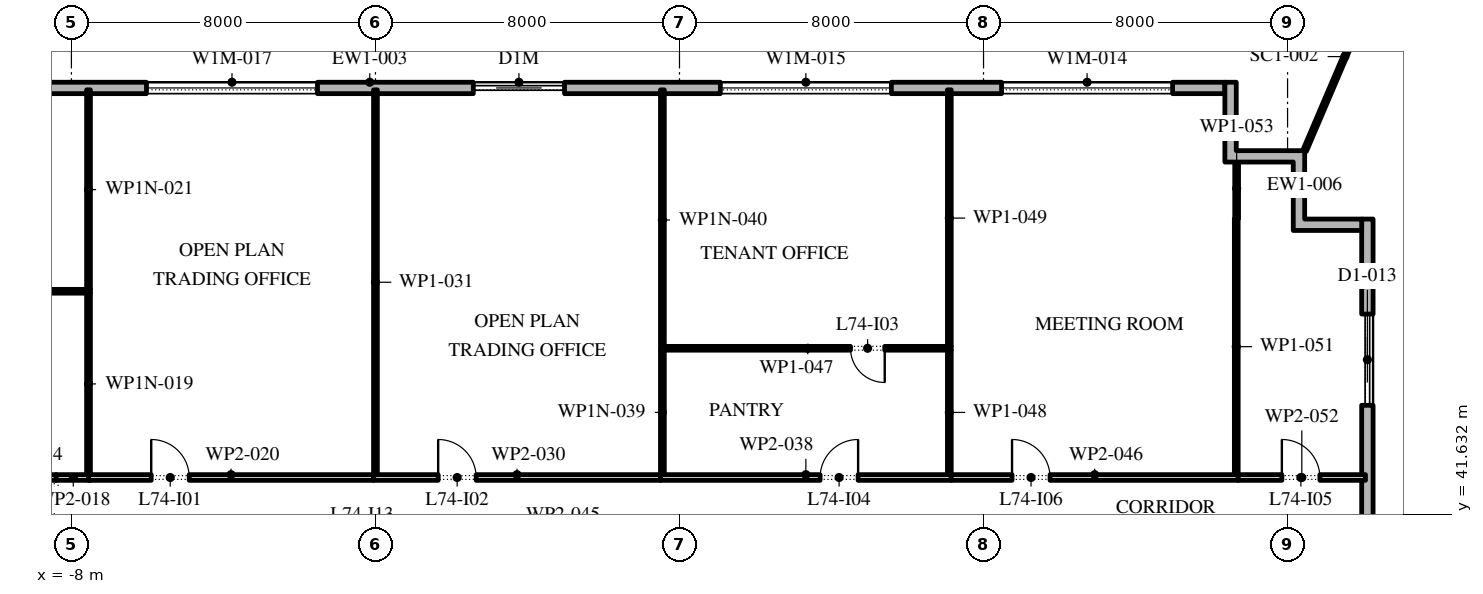
"""IFC4 building model, lengths in metres.
Left out: names, types, materials, properties, quantities, classifications, styles, units other than length and angle.
Written with IfcOpenShell. Run it as: python <this file> out.ifc"""

import sys

from ifc_helpers import new_model, si_unit, direction, frame, frame_2d, origin, place, context, subcontext, project, spatial, polyline, rectangle, outline, extrude, element, fill, save


model = new_model("IFC4")
c1 = context("Model", 3, precision=1e-05, world=origin(), true_north=direction((0.0, 1.0)))
c2 = subcontext(c1, "Body", "Model", "MODEL_VIEW")
j1 = project(units=[si_unit("LENGTHUNIT", "METRE"), si_unit("PLANEANGLEUNIT", "RADIAN")], contexts=[c1])
p1 = place(None, origin())
s1 = spatial("IfcSite", under=j1, at=p1, CompositionType="ELEMENT")
p2 = place(p1, origin())
s2 = spatial("IfcBuilding", under=s1, at=p2, CompositionType="ELEMENT")
p3 = place(p2, frame((0.0, 0.0, 338.4)))
s3 = spatial("IfcBuildingStorey", under=s2, at=p3, CompositionType="ELEMENT", Elevation=338.4)
p4 = place(p3, frame((26.1, -2.1, 0.0), z_axis=(0.0, 0.0, 1.0), x_axis=(0.0, 1.0, 0.0)))
e1 = element("IfcWall", 1, at=p4, inside=s3, PredefinedType="STANDARD", context=c2, shape_type="SweptSolid", body=[
    extrude(rectangle(XDim=51.5, YDim=0.3, at=frame_2d((25.75, 0.0))), origin(), (0.0, 0.0, 1.0), 4.0),
])
p5 = place(p4, frame((1.3, 0.0, 0.45)))
e2 = element("IfcOpeningElement", 2, at=p5, cuts=e1, PredefinedType="OPENING", context=c2, shape_type="SweptSolid", body=[
    extrude(rectangle(XDim=4.5, YDim=3.05, at=frame_2d((2.25, 1.525))), frame((0.0, 0.16, 0.0), z_axis=(0.0, -1.0, 0.0), x_axis=(1.0, 0.0, 0.0)), (0.0, 0.0, 1.0), 0.32),
])
p6 = place(p4, frame((8.55, 0.0, 0.45)))
e3 = element("IfcOpeningElement", 3, at=p6, cuts=e1, PredefinedType="OPENING", context=c2, shape_type="SweptSolid", body=[
    extrude(rectangle(XDim=4.5, YDim=3.05, at=frame_2d((2.25, 1.525))), frame((0.0, 0.16, 0.0), z_axis=(0.0, -1.0, 0.0), x_axis=(1.0, 0.0, 0.0)), (0.0, 0.0, 1.0), 0.32),
])
p7 = place(p4, frame((17.0, 0.0, 0.0)))
e4 = element("IfcOpeningElement", 4, at=p7, cuts=e1, PredefinedType="OPENING", context=c2, shape_type="SweptSolid", body=[
    extrude(rectangle(XDim=2.4, YDim=3.5, at=frame_2d((1.2, 1.75))), frame((0.0, 0.16, 0.0), z_axis=(0.0, -1.0, 0.0), x_axis=(1.0, 0.0, 0.0)), (0.0, 0.0, 1.0), 0.32),
])
p8 = place(p4, frame((23.35, 0.0, 0.45)))
e5 = element("IfcOpeningElement", 5, at=p8, cuts=e1, PredefinedType="OPENING", context=c2, shape_type="SweptSolid", body=[
    extrude(rectangle(XDim=4.5, YDim=3.05, at=frame_2d((2.25, 1.525))), frame((0.0, 0.16, 0.0), z_axis=(0.0, -1.0, 0.0), x_axis=(1.0, 0.0, 0.0)), (0.0, 0.0, 1.0), 0.32),
])
p9 = place(p4, frame((30.75, 0.0, 0.45)))
e6 = element("IfcOpeningElement", 6, at=p9, cuts=e1, PredefinedType="OPENING", context=c2, shape_type="SweptSolid", body=[
    extrude(rectangle(XDim=4.5, YDim=3.05, at=frame_2d((2.25, 1.525))), frame((0.0, 0.16, 0.0), z_axis=(0.0, -1.0, 0.0), x_axis=(1.0, 0.0, 0.0)), (0.0, 0.0, 1.0), 0.32),
])
p10 = place(p4, frame((38.15, 0.0, 0.45)))
e7 = element("IfcOpeningElement", 7, at=p10, cuts=e1, PredefinedType="OPENING", context=c2, shape_type="SweptSolid", body=[
    extrude(rectangle(XDim=4.5, YDim=3.05, at=frame_2d((2.25, 1.525))), frame((0.0, 0.16, 0.0), z_axis=(0.0, -1.0, 0.0), x_axis=(1.0, 0.0, 0.0)), (0.0, 0.0, 1.0), 0.32),
])
p11 = place(p4, frame((46.6, 0.0, 0.0)))
e8 = element("IfcOpeningElement", 8, at=p11, cuts=e1, PredefinedType="OPENING", context=c2, shape_type="SweptSolid", body=[
    extrude(rectangle(XDim=2.4, YDim=3.5, at=frame_2d((1.2, 1.75))), frame((0.0, 0.16, 0.0), z_axis=(0.0, -1.0, 0.0), x_axis=(1.0, 0.0, 0.0)), (0.0, 0.0, 1.0), 0.32),
])
p12 = place(p3, frame((22.35, 52.85, 0.0), z_axis=(0.0, 0.0, 1.0), x_axis=(-1.0, 0.0, 0.0)))
e9 = element("IfcWall", 9, at=p12, inside=s3, PredefinedType="STANDARD", context=c2, shape_type="SweptSolid", body=[
    extrude(rectangle(XDim=45.0, YDim=0.3, at=frame_2d((22.5, 0.0))), origin(), (0.0, 0.0, 1.0), 4.0),
])
p13 = place(p12, frame((1.375, 0.0, 0.45)))
e10 = element("IfcOpeningElement", 10, at=p13, cuts=e9, PredefinedType="OPENING", context=c2, shape_type="SweptSolid", body=[
    extrude(rectangle(XDim=4.5, YDim=2.575, at=frame_2d((2.25, 1.288))), frame((0.0, 0.16, 0.0), z_axis=(0.0, -1.0, 0.0), x_axis=(1.0, 0.0, 0.0)), (0.0, 0.0, 1.0), 0.32),
])
p14 = place(p12, frame((8.775, 0.0, 0.45)))
e11 = element("IfcOpeningElement", 11, at=p14, cuts=e9, PredefinedType="OPENING", context=c2, shape_type="SweptSolid", body=[
    extrude(rectangle(XDim=4.5, YDim=2.575, at=frame_2d((2.25, 1.288))), frame((0.0, 0.16, 0.0), z_axis=(0.0, -1.0, 0.0), x_axis=(1.0, 0.0, 0.0)), (0.0, 0.0, 1.0), 0.32),
])
p15 = place(p12, frame((17.375, 0.0, 0.0)))
e12 = element("IfcOpeningElement", 12, at=p15, cuts=e9, PredefinedType="OPENING", context=c2, shape_type="SweptSolid", body=[
    extrude(rectangle(XDim=2.4, YDim=3.025, at=frame_2d((1.2, 1.512))), frame((0.0, 0.16, 0.0), z_axis=(0.0, -1.0, 0.0), x_axis=(1.0, 0.0, 0.0)), (0.0, 0.0, 1.0), 0.32),
])
p16 = place(p12, frame((23.875, 0.0, 0.45)))
e13 = element("IfcOpeningElement", 13, at=p16, cuts=e9, PredefinedType="OPENING", context=c2, shape_type="SweptSolid", body=[
    extrude(rectangle(XDim=4.5, YDim=2.575, at=frame_2d((2.25, 1.288))), frame((0.0, 0.16, 0.0), z_axis=(0.0, -1.0, 0.0), x_axis=(1.0, 0.0, 0.0)), (0.0, 0.0, 1.0), 0.32),
])
p17 = place(p12, frame((31.425, 0.0, 0.45)))
e14 = element("IfcOpeningElement", 14, at=p17, cuts=e9, PredefinedType="OPENING", context=c2, shape_type="SweptSolid", body=[
    extrude(rectangle(XDim=4.5, YDim=2.575, at=frame_2d((2.25, 1.288))), frame((0.0, 0.16, 0.0), z_axis=(0.0, -1.0, 0.0), x_axis=(1.0, 0.0, 0.0)), (0.0, 0.0, 1.0), 0.32),
])
p18 = place(p12, frame((38.975, 0.0, 0.45)))
e15 = element("IfcOpeningElement", 15, at=p18, cuts=e9, PredefinedType="OPENING", context=c2, shape_type="SweptSolid", body=[
    extrude(rectangle(XDim=4.5, YDim=2.575, at=frame_2d((2.25, 1.288))), frame((0.0, 0.16, 0.0), z_axis=(0.0, -1.0, 0.0), x_axis=(1.0, 0.0, 0.0)), (0.0, 0.0, 1.0), 0.32),
])
p19 = place(p3, origin())
e16 = element("IfcWall", 16, at=p19, inside=s3, PredefinedType="STANDARD", context=c2, shape_type="SweptSolid", body=[
    extrude(outline(polyline([(24.15, 50.9), (22.35, 50.9), (22.35, 53.0), (22.65, 53.0), (22.65, 51.2), (24.45, 51.2), (24.45, 49.4), (25.95, 49.4), (25.95, 49.1), (24.15, 49.1), (24.15, 50.9)])), origin(), (0.0, 0.0, 1.0), 4.0),
])
p20 = place(p3, frame((24.45, 51.2, -0.05), z_axis=(0.0, 0.0, 1.0), x_axis=(0.392867927022, 0.919594906422, 0.0)))
e17 = element("IfcWall", 17, at=p20, inside=s3, PredefinedType="STANDARD", context=c2, shape_type="SweptSolid", body=[
    extrude(rectangle(XDim=5.382, YDim=0.1, at=frame_2d((2.691, 0.0))), origin(), (0.0, 0.0, 1.0), 4.05),
])
p21 = place(p3, frame((-15.05, 47.5, 0.0), z_axis=(0.0, 0.0, 1.0), x_axis=(1.0, 0.0, 0.0)))
e18 = element("IfcWall", 18, at=p21, inside=s3, PredefinedType="PARTITIONING", context=c2, shape_type="SweptSolid", body=[
    extrude(rectangle(XDim=7.55, YDim=0.1, at=frame_2d((3.775, 0.0))), origin(), (0.0, 0.0, 1.0), 4.0),
])
p22 = place(p21, frame((4.9, 0.0, 0.0)))
e19 = element("IfcOpeningElement", 19, at=p22, cuts=e18, PredefinedType="OPENING", context=c2, shape_type="SweptSolid", body=[
    extrude(rectangle(XDim=0.9, YDim=2.1, at=frame_2d((0.45, 1.05))), frame((0.0, 0.06, 0.0), z_axis=(0.0, -1.0, 0.0), x_axis=(1.0, 0.0, 0.0)), (0.0, 0.0, 1.0), 0.12),
])
p23 = place(p3, frame((-10.0, 42.6, 0.0), z_axis=(0.0, 0.0, 1.0), x_axis=(1.0, 0.0, 0.0)))
e20 = element("IfcWall", 20, at=p23, inside=s3, PredefinedType="PARTITIONING", context=c2, shape_type="SweptSolid", body=[
    extrude(rectangle(XDim=1.6, YDim=0.15, at=frame_2d((0.8, 0.0))), origin(), (0.0, 0.0, 1.0), 4.0),
])
p24 = place(p3, frame((-8.4, 42.6, 0.0), z_axis=(0.0, 0.0, 1.0), x_axis=(1.0, 0.0, 0.0)))
e21 = element("IfcWall", 21, at=p24, inside=s3, PredefinedType="PARTITIONING", context=c2, shape_type="SweptSolid", body=[
    extrude(rectangle(XDim=0.9, YDim=0.15, at=frame_2d((0.45, 0.0))), origin(), (0.0, 0.0, 1.0), 4.0),
])
p25 = place(p3, frame((-7.55, 42.675, 0.0), z_axis=(0.0, 0.0, 1.0), x_axis=(0.0, 1.0, 0.0)))
e22 = element("IfcWall", 22, at=p25, inside=s3, PredefinedType="PARTITIONING", context=c2, shape_type="SweptSolid", body=[
    extrude(rectangle(XDim=4.775, YDim=0.1, at=frame_2d((2.387, 0.0))), origin(), (0.0, 0.0, 1.0), 3.164),
])
p26 = place(p3, frame((-7.55, 42.6, 0.0), z_axis=(0.0, 0.0, 1.0), x_axis=(1.0, 0.0, 0.0)))
e23 = element("IfcWall", 23, at=p26, inside=s3, PredefinedType="PARTITIONING", context=c2, shape_type="SweptSolid", body=[
    extrude(rectangle(XDim=7.5, YDim=0.15, at=frame_2d((3.75, 0.0))), origin(), (0.0, 0.0, 1.0), 4.0),
])
p27 = place(p26, frame((1.65, 0.0, 0.0)))
e24 = element("IfcOpeningElement", 24, at=p27, cuts=e23, PredefinedType="OPENING", context=c2, shape_type="SweptSolid", body=[
    extrude(rectangle(XDim=1.0, YDim=2.1, at=frame_2d((0.5, 1.05))), frame((0.0, 0.085, 0.0), z_axis=(0.0, -1.0, 0.0), x_axis=(1.0, 0.0, 0.0)), (0.0, 0.0, 1.0), 0.17),
])
p28 = place(p3, frame((-7.55, 47.55, 0.0), z_axis=(0.0, 0.0, 1.0), x_axis=(0.0, 1.0, 0.0)))
e25 = element("IfcWall", 25, at=p28, inside=s3, PredefinedType="PARTITIONING", context=c2, shape_type="SweptSolid", body=[
    extrude(rectangle(XDim=5.25, YDim=0.1, at=frame_2d((2.625, 0.0))), origin(), (0.0, 0.0, 1.0), 3.164),
])
p29 = place(p3, frame((-0.05, 42.6, 0.0), z_axis=(0.0, 0.0, 1.0), x_axis=(1.0, 0.0, 0.0)))
e26 = element("IfcWall", 26, at=p29, inside=s3, PredefinedType="PARTITIONING", context=c2, shape_type="SweptSolid", body=[
    extrude(rectangle(XDim=7.55, YDim=0.15, at=frame_2d((3.775, 0.0))), origin(), (0.0, 0.0, 1.0), 4.0),
])
p30 = place(p29, frame((1.7, 0.0, 0.0)))
e27 = element("IfcOpeningElement", 27, at=p30, cuts=e26, PredefinedType="OPENING", context=c2, shape_type="SweptSolid", body=[
    extrude(rectangle(XDim=1.0, YDim=2.1, at=frame_2d((0.5, 1.05))), frame((0.0, 0.085, 0.0), z_axis=(0.0, -1.0, 0.0), x_axis=(1.0, 0.0, 0.0)), (0.0, 0.0, 1.0), 0.17),
])
p31 = place(p3, frame((0.0, 52.8, 0.0), z_axis=(0.0, 0.0, 1.0), x_axis=(0.0, -1.0, 0.0)))
e28 = element("IfcWall", 28, at=p31, inside=s3, PredefinedType="PARTITIONING", context=c2, shape_type="SweptSolid", body=[
    extrude(rectangle(XDim=10.125, YDim=0.1, at=frame_2d((5.062, 0.0))), origin(), (0.0, 0.0, 1.0), 4.0),
])
p32 = place(p3, frame((7.5, 42.6, 0.0), z_axis=(0.0, 0.0, 1.0), x_axis=(1.0, 0.0, 0.0)))
e29 = element("IfcWall", 29, at=p32, inside=s3, PredefinedType="PARTITIONING", context=c2, shape_type="SweptSolid", body=[
    extrude(rectangle(XDim=7.65, YDim=0.15, at=frame_2d((3.825, 0.0))), origin(), (0.0, 0.0, 1.0), 4.0),
])
p33 = place(p32, frame((4.2, 0.0, 0.0)))
e30 = element("IfcOpeningElement", 30, at=p33, cuts=e29, PredefinedType="OPENING", context=c2, shape_type="SweptSolid", body=[
    extrude(rectangle(XDim=1.0, YDim=2.1, at=frame_2d((0.5, 1.05))), frame((0.0, 0.085, 0.0), z_axis=(0.0, -1.0, 0.0), x_axis=(1.0, 0.0, 0.0)), (0.0, 0.0, 1.0), 0.17),
])
p34 = place(p3, frame((7.55, 45.95, 0.0), z_axis=(0.0, 0.0, 1.0), x_axis=(0.0, -1.0, 0.0)))
e31 = element("IfcWall", 31, at=p34, inside=s3, PredefinedType="PARTITIONING", context=c2, shape_type="SweptSolid", body=[
    extrude(rectangle(XDim=3.275, YDim=0.1, at=frame_2d((1.637, 0.0))), origin(), (0.0, 0.0, 1.0), 3.164),
])
p35 = place(p3, frame((7.55, 52.8, 0.0), z_axis=(0.0, 0.0, 1.0), x_axis=(0.0, -1.0, 0.0)))
e32 = element("IfcWall", 32, at=p35, inside=s3, PredefinedType="PARTITIONING", context=c2, shape_type="SweptSolid", body=[
    extrude(rectangle(XDim=6.85, YDim=0.1, at=frame_2d((3.425, 0.0))), origin(), (0.0, 0.0, 1.0), 3.164),
])
p36 = place(p3, frame((15.15, 42.6, 0.0), z_axis=(0.0, 0.0, 1.0), x_axis=(1.0, 0.0, 0.0)))
e33 = element("IfcWall", 33, at=p36, inside=s3, PredefinedType="PARTITIONING", context=c2, shape_type="SweptSolid", body=[
    extrude(rectangle(XDim=7.55, YDim=0.15, at=frame_2d((3.775, 0.0))), origin(), (0.0, 0.0, 1.0), 4.0),
])
p37 = place(p36, frame((1.6, 0.0, 0.0)))
e34 = element("IfcOpeningElement", 34, at=p37, cuts=e33, PredefinedType="OPENING", context=c2, shape_type="SweptSolid", body=[
    extrude(rectangle(XDim=1.0, YDim=2.1, at=frame_2d((0.5, 1.05))), frame((0.0, 0.085, 0.0), z_axis=(0.0, -1.0, 0.0), x_axis=(1.0, 0.0, 0.0)), (0.0, 0.0, 1.0), 0.17),
])
p38 = place(p3, frame((15.15, 46.0, 0.0), z_axis=(0.0, 0.0, 1.0), x_axis=(-1.0, 0.0, 0.0)))
e35 = element("IfcWall", 35, at=p38, inside=s3, PredefinedType="PARTITIONING", context=c2, shape_type="SweptSolid", body=[
    extrude(rectangle(XDim=7.55, YDim=0.1, at=frame_2d((3.775, 0.0))), origin(), (0.0, 0.0, 1.0), 4.0),
])
p39 = place(p38, frame((1.75, 0.0, 0.0)))
e36 = element("IfcOpeningElement", 36, at=p39, cuts=e35, PredefinedType="OPENING", context=c2, shape_type="SweptSolid", body=[
    extrude(rectangle(XDim=0.9, YDim=2.1, at=frame_2d((0.45, 1.05))), frame((0.0, 0.06, 0.0), z_axis=(0.0, -1.0, 0.0), x_axis=(1.0, 0.0, 0.0)), (0.0, 0.0, 1.0), 0.12),
])
p40 = place(p3, frame((15.1, 45.95, 0.0), z_axis=(0.0, 0.0, 1.0), x_axis=(0.0, -1.0, 0.0)))
e37 = element("IfcWall", 37, at=p40, inside=s3, PredefinedType="PARTITIONING", context=c2, shape_type="SweptSolid", body=[
    extrude(rectangle(XDim=3.275, YDim=0.1, at=frame_2d((1.637, 0.0))), origin(), (0.0, 0.0, 1.0), 4.0),
])
p41 = place(p3, frame((15.1, 52.8, 0.0), z_axis=(0.0, 0.0, 1.0), x_axis=(0.0, -1.0, 0.0)))
e38 = element("IfcWall", 38, at=p41, inside=s3, PredefinedType="PARTITIONING", context=c2, shape_type="SweptSolid", body=[
    extrude(rectangle(XDim=6.75, YDim=0.1, at=frame_2d((3.375, 0.0))), origin(), (0.0, 0.0, 1.0), 4.0),
])
p42 = place(p3, frame((22.65, 42.675, 0.0), z_axis=(0.0, 0.0, 1.0), x_axis=(0.0, 1.0, 0.0)))
e39 = element("IfcWall", 39, at=p42, inside=s3, PredefinedType="PARTITIONING", context=c2, shape_type="SweptSolid", body=[
    extrude(rectangle(XDim=6.735, YDim=0.1, at=frame_2d((3.367, 0.0))), origin(), (0.0, 0.0, 1.0), 4.0),
])
p43 = place(p3, frame((22.7, 42.6, 0.0), z_axis=(0.0, 0.0, 1.0), x_axis=(1.0, 0.0, 0.0)))
e40 = element("IfcWall", 40, at=p43, inside=s3, PredefinedType="PARTITIONING", context=c2, shape_type="SweptSolid", body=[
    extrude(rectangle(XDim=3.35, YDim=0.15, at=frame_2d((1.675, 0.0))), origin(), (0.0, 0.0, 1.0), 4.0),
])
p44 = place(p43, frame((1.15, 0.0, 0.0)))
e41 = element("IfcOpeningElement", 41, at=p44, cuts=e40, PredefinedType="OPENING", context=c2, shape_type="SweptSolid", body=[
    extrude(rectangle(XDim=1.0, YDim=2.1, at=frame_2d((0.5, 1.05))), frame((0.0, 0.085, 0.0), z_axis=(0.0, -1.0, 0.0), x_axis=(1.0, 0.0, 0.0)), (0.0, 0.0, 1.0), 0.17),
])
p45 = place(p3, frame((22.66, 49.41, 0.0), z_axis=(0.0, 0.0, 1.0), x_axis=(0.0, 1.0, 0.0)))
e42 = element("IfcWall", 42, at=p45, inside=s3, PredefinedType="PARTITIONING", context=c2, shape_type="SweptSolid", body=[
    extrude(rectangle(XDim=1.59, YDim=0.1, at=frame_2d((0.795, 0.0))), origin(), (0.0, 0.0, 1.0), 4.0),
])
p46 = place(p11, origin())
e43 = element("IfcDoor", 43, at=p46, inside=s3, OperationType="DOUBLE_DOOR_SLIDING", PredefinedType="DOOR", context=c2, shape_type="SweptSolid", body=[
    extrude(rectangle(XDim=2.4, YDim=3.5, at=frame_2d((1.2, 1.75))), frame((0.0, 0.025, 0.0), z_axis=(0.0, -1.0, 0.0), x_axis=(1.0, 0.0, 0.0)), (0.0, 0.0, 1.0), 0.05),
])
fill(e8, e43)
p47 = place(p13, origin())
e44 = element("IfcWindow", 44, at=p47, inside=s3, PartitioningType="DOUBLE_PANEL_VERTICAL", PredefinedType="WINDOW", context=c2, shape_type="SweptSolid", body=[
    extrude(rectangle(XDim=4.5, YDim=2.575, at=frame_2d((2.25, 1.288))), frame((0.0, 0.03, 0.0), z_axis=(0.0, -1.0, 0.0), x_axis=(1.0, 0.0, 0.0)), (0.0, 0.0, 1.0), 0.06),
])
fill(e10, e44)
p48 = place(p14, origin())
e45 = element("IfcWindow", 45, at=p48, inside=s3, PartitioningType="DOUBLE_PANEL_VERTICAL", PredefinedType="WINDOW", context=c2, shape_type="SweptSolid", body=[
    extrude(rectangle(XDim=4.5, YDim=2.575, at=frame_2d((2.25, 1.288))), frame((0.0, 0.03, 0.0), z_axis=(0.0, -1.0, 0.0), x_axis=(1.0, 0.0, 0.0)), (0.0, 0.0, 1.0), 0.06),
])
fill(e11, e45)
p49 = place(p15, origin())
e46 = element("IfcDoor", 46, at=p49, inside=s3, OperationType="DOUBLE_DOOR_SLIDING", PredefinedType="DOOR", context=c2, shape_type="SweptSolid", body=[
    extrude(rectangle(XDim=2.4, YDim=3.025, at=frame_2d((1.2, 1.512))), frame((0.0, 0.025, 0.0), z_axis=(0.0, -1.0, 0.0), x_axis=(1.0, 0.0, 0.0)), (0.0, 0.0, 1.0), 0.05),
])
fill(e12, e46)
p50 = place(p16, origin())
e47 = element("IfcWindow", 47, at=p50, inside=s3, PartitioningType="DOUBLE_PANEL_VERTICAL", PredefinedType="WINDOW", context=c2, shape_type="SweptSolid", body=[
    extrude(rectangle(XDim=4.5, YDim=2.575, at=frame_2d((2.25, 1.288))), frame((0.0, 0.03, 0.0), z_axis=(0.0, -1.0, 0.0), x_axis=(1.0, 0.0, 0.0)), (0.0, 0.0, 1.0), 0.06),
])
fill(e13, e47)
p51 = place(p27, origin())
e48 = element("IfcDoor", 48, at=p51, inside=s3, OperationType="SINGLE_SWING_RIGHT", PredefinedType="DOOR", context=c2, shape_type="SweptSolid", body=[
    extrude(rectangle(XDim=1.0, YDim=2.1, at=frame_2d((0.5, 1.05))), frame((0.0, 0.025, 0.0), z_axis=(0.0, -1.0, 0.0), x_axis=(1.0, 0.0, 0.0)), (0.0, 0.0, 1.0), 0.05),
])
fill(e24, e48)
p52 = place(p30, origin())
e49 = element("IfcDoor", 49, at=p52, inside=s3, OperationType="SINGLE_SWING_RIGHT", PredefinedType="DOOR", context=c2, shape_type="SweptSolid", body=[
    extrude(rectangle(XDim=1.0, YDim=2.1, at=frame_2d((0.5, 1.05))), frame((0.0, 0.025, 0.0), z_axis=(0.0, -1.0, 0.0), x_axis=(1.0, 0.0, 0.0)), (0.0, 0.0, 1.0), 0.05),
])
fill(e27, e49)
p53 = place(p39, origin())
e50 = element("IfcDoor", 50, at=p53, inside=s3, OperationType="SINGLE_SWING_RIGHT", PredefinedType="DOOR", context=c2, shape_type="SweptSolid", body=[
    extrude(rectangle(XDim=0.9, YDim=2.1, at=frame_2d((0.45, 1.05))), frame((0.0, 0.025, 0.0), z_axis=(0.0, -1.0, 0.0), x_axis=(1.0, 0.0, 0.0)), (0.0, 0.0, 1.0), 0.05),
])
fill(e36, e50)
p54 = place(p33, origin())
e51 = element("IfcDoor", 51, at=p54, inside=s3, OperationType="SINGLE_SWING_LEFT", PredefinedType="DOOR", context=c2, shape_type="SweptSolid", body=[
    extrude(rectangle(XDim=1.0, YDim=2.1, at=frame_2d((0.5, 1.05))), frame((0.0, 0.025, 0.0), z_axis=(0.0, -1.0, 0.0), x_axis=(1.0, 0.0, 0.0)), (0.0, 0.0, 1.0), 0.05),
])
fill(e30, e51)
p55 = place(p44, origin())
e52 = element("IfcDoor", 52, at=p55, inside=s3, OperationType="SINGLE_SWING_RIGHT", PredefinedType="DOOR", context=c2, shape_type="SweptSolid", body=[
    extrude(rectangle(XDim=1.0, YDim=2.1, at=frame_2d((0.5, 1.05))), frame((0.0, 0.025, 0.0), z_axis=(0.0, -1.0, 0.0), x_axis=(1.0, 0.0, 0.0)), (0.0, 0.0, 1.0), 0.05),
])
fill(e41, e52)
p56 = place(p37, origin())
e53 = element("IfcDoor", 53, at=p56, inside=s3, OperationType="SINGLE_SWING_RIGHT", PredefinedType="DOOR", context=c2, shape_type="SweptSolid", body=[
    extrude(rectangle(XDim=1.0, YDim=2.1, at=frame_2d((0.5, 1.05))), frame((0.0, 0.025, 0.0), z_axis=(0.0, -1.0, 0.0), x_axis=(1.0, 0.0, 0.0)), (0.0, 0.0, 1.0), 0.05),
])
fill(e34, e53)
save(model, sys.argv[1])
